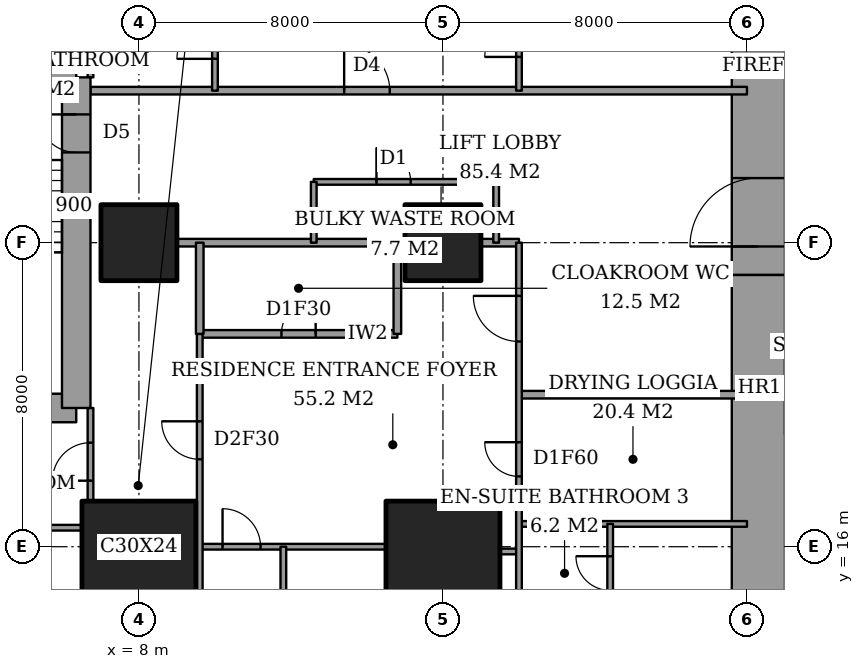
"""IFC4 building model, lengths in metres.
Left out: names, types, materials, properties, quantities, classifications, styles, units other than length and angle.
Written with IfcOpenShell. Run it as: python <this file> out.ifc"""

import sys

from ifc_helpers import new_model, si_unit, direction, frame, frame_2d, origin, origin_2d, place, context, subcontext, project, spatial, rectangle, extrude, element, fill, save


model = new_model("IFC4")
c1 = context("Model", 3, precision=1e-05, world=origin(), true_north=direction((0.0, 1.0)))
c2 = subcontext(c1, "Body", "Model", "MODEL_VIEW")
j1 = project(units=[si_unit("LENGTHUNIT", "METRE"), si_unit("PLANEANGLEUNIT", "RADIAN")], contexts=[c1])
p1 = place(None, origin())
s1 = spatial("IfcSite", under=j1, at=p1, CompositionType="ELEMENT")
p2 = place(p1, origin())
s2 = spatial("IfcBuilding", under=s1, at=p2, CompositionType="ELEMENT")
p3 = place(p2, frame((0.0, 0.0, 83.6)))
s3 = spatial("IfcBuildingStorey", under=s2, at=p3, CompositionType="ELEMENT", Elevation=83.6)
p4 = place(p3, frame((8.0, 16.0, 0.0), z_axis=(0.0, 0.0, 1.0), x_axis=(1.0, 0.0, 0.0)))
e1 = element("IfcColumn", 1, at=p4, inside=s3, PredefinedType="COLUMN", context=c2, shape_type="SweptSolid", body=[
    extrude(rectangle(XDim=3.0, YDim=2.4, at=origin_2d()), origin(), (0.0, 0.0, 1.0), 3.6),
])
p5 = place(p3, frame((8.0, 24.0, 0.0), z_axis=(0.0, 0.0, 1.0), x_axis=(1.0, 0.0, 0.0)))
e2 = element("IfcColumn", 2, at=p5, inside=s3, PredefinedType="COLUMN", context=c2, shape_type="SweptSolid", body=[
    extrude(rectangle(XDim=2.0, YDim=2.0, at=origin_2d()), origin(), (0.0, 0.0, 1.0), 3.6),
])
p6 = place(p3, frame((16.0, 16.0, 0.0), z_axis=(0.0, 0.0, 1.0), x_axis=(1.0, 0.0, 0.0)))
e3 = element("IfcColumn", 3, at=p6, inside=s3, PredefinedType="COLUMN", context=c2, shape_type="SweptSolid", body=[
    extrude(rectangle(XDim=3.0, YDim=2.4, at=origin_2d()), origin(), (0.0, 0.0, 1.0), 3.6),
])
p7 = place(p3, frame((16.0, 24.0, 0.0), z_axis=(0.0, 0.0, 1.0), x_axis=(1.0, 0.0, 0.0)))
e4 = element("IfcColumn", 4, at=p7, inside=s3, PredefinedType="COLUMN", context=c2, shape_type="SweptSolid", body=[
    extrude(rectangle(XDim=2.0, YDim=2.0, at=origin_2d()), origin(), (0.0, 0.0, 1.0), 3.6),
])
p8 = place(p3, frame((24.3, 13.0, 0.0), z_axis=(0.0, 0.0, 1.0), x_axis=(0.0, 1.0, 0.0)))
e5 = element("IfcWall", 5, at=p8, inside=s3, PredefinedType="SHEAR", context=c2, shape_type="SweptSolid", body=[
    extrude(rectangle(XDim=10.15, YDim=1.4, at=frame_2d((5.075, 0.0))), origin(), (0.0, 0.0, 1.0), 3.6),
])
p9 = place(p3, frame((24.3, 23.15, 0.0), z_axis=(0.0, 0.0, 1.0), x_axis=(0.0, 1.0, 0.0)))
e6 = element("IfcWall", 6, at=p9, inside=s3, PredefinedType="SHEAR", context=c2, shape_type="SweptSolid", body=[
    extrude(rectangle(XDim=11.85, YDim=1.4, at=frame_2d((5.925, 0.0))), origin(), (0.0, 0.0, 1.0), 3.6),
])
p10 = place(p9, frame((0.75, 0.0, 0.0)))
e7 = element("IfcOpeningElement", 7, at=p10, cuts=e6, PredefinedType="OPENING", context=c2, shape_type="SweptSolid", body=[
    extrude(rectangle(XDim=1.8, YDim=2.4, at=frame_2d((0.9, 1.2))), frame((0.0, 0.71, 0.0), z_axis=(0.0, -1.0, 0.0), x_axis=(1.0, 0.0, 0.0)), (0.0, 0.0, 1.0), 1.42),
])
p11 = place(p3, frame((1.9, 19.65, 0.0), z_axis=(0.0, 0.0, 1.0), x_axis=(1.0, 0.0, 0.0)))
e8 = element("IfcWall", 8, at=p11, inside=s3, PredefinedType="SHEAR", context=c2, shape_type="SweptSolid", body=[
    extrude(rectangle(XDim=4.45, YDim=0.75, at=frame_2d((2.225, 0.0))), origin(), (0.0, 0.0, 1.0), 3.6),
])
p12 = place(p3, frame((6.35, 19.65, 0.0), z_axis=(0.0, 0.0, 1.0), x_axis=(0.0, 1.0, 0.0)))
e9 = element("IfcWall", 9, at=p12, inside=s3, PredefinedType="SHEAR", context=c2, shape_type="SweptSolid", body=[
    extrude(rectangle(XDim=8.7, YDim=0.75, at=frame_2d((4.35, 0.0))), origin(), (0.0, 0.0, 1.0), 3.6),
])
p13 = place(p12, frame((6.725, 0.0, 0.0)))
e10 = element("IfcOpeningElement", 10, at=p13, cuts=e9, PredefinedType="OPENING", context=c2, shape_type="SweptSolid", body=[
    extrude(rectangle(XDim=1.0, YDim=2.1, at=frame_2d((0.5, 1.05))), frame((0.0, 0.385, 0.0), z_axis=(0.0, -1.0, 0.0), x_axis=(1.0, 0.0, 0.0)), (0.0, 0.0, 1.0), 0.77),
])
p14 = place(p3, frame((6.35, 28.35, 0.0), z_axis=(0.0, 0.0, 1.0), x_axis=(-1.0, 0.0, 0.0)))
e11 = element("IfcWall", 11, at=p14, inside=s3, PredefinedType="SHEAR", context=c2, shape_type="SweptSolid", body=[
    extrude(rectangle(XDim=4.45, YDim=0.75, at=frame_2d((2.225, 0.0))), origin(), (0.0, 0.0, 1.0), 3.6),
])
p15 = place(p3, frame((17.5, 15.875, 0.0), z_axis=(0.0, 0.0, 1.0), x_axis=(1.0, 0.0, 0.0)))
e12 = element("IfcWall", 12, at=p15, inside=s3, PredefinedType="PARTITIONING", context=c2, shape_type="SweptSolid", body=[
    extrude(rectangle(XDim=0.5, YDim=0.15, at=frame_2d((0.25, 0.0))), origin(), (0.0, 0.0, 1.0), 2.634),
])
p16 = place(p3, frame((9.6, 16.0, 0.0), z_axis=(0.0, 0.0, 1.0), x_axis=(1.0, 0.0, 0.0)))
e13 = element("IfcWall", 13, at=p16, inside=s3, PredefinedType="PARTITIONING", context=c2, shape_type="SweptSolid", body=[
    extrude(rectangle(XDim=4.9, YDim=0.15, at=frame_2d((2.45, 0.0))), origin(), (0.0, 0.0, 1.0), 2.634),
])
p17 = place(p16, frame((0.6, 0.0, 0.0)))
e14 = element("IfcOpeningElement", 14, at=p17, cuts=e13, PredefinedType="OPENING", context=c2, shape_type="SweptSolid", body=[
    extrude(rectangle(XDim=1.0, YDim=2.1, at=frame_2d((0.5, 1.05))), frame((0.0, 0.085, 0.0), z_axis=(0.0, -1.0, 0.0), x_axis=(1.0, 0.0, 0.0)), (0.0, 0.0, 1.0), 0.17),
])
p18 = place(p3, frame((1.35, 16.5, 0.0), z_axis=(0.0, 0.0, 1.0), x_axis=(1.0, 0.0, 0.0)))
e15 = element("IfcWall", 15, at=p18, inside=s3, PredefinedType="PARTITIONING", context=c2, shape_type="SweptSolid", body=[
    extrude(rectangle(XDim=5.15, YDim=0.15, at=frame_2d((2.575, 0.0))), origin(), (0.0, 0.0, 1.0), 3.35),
])
p19 = place(p3, frame((18.0, 16.6, 0.0), z_axis=(0.0, 0.0, 1.0), x_axis=(1.0, 0.0, 0.0)))
e16 = element("IfcWall", 16, at=p19, inside=s3, PredefinedType="PARTITIONING", context=c2, shape_type="SweptSolid", body=[
    extrude(rectangle(XDim=6.0, YDim=0.15, at=frame_2d((3.0, 0.0))), origin(), (0.0, 0.0, 1.0), 3.35),
])
p20 = place(p3, frame((18.0, 20.0, 0.0), z_axis=(0.0, 0.0, 1.0), x_axis=(1.0, 0.0, 0.0)))
e17 = element("IfcWall", 17, at=p20, inside=s3, PredefinedType="PARTITIONING", context=c2, shape_type="SweptSolid", body=[
    extrude(rectangle(XDim=6.0, YDim=0.2, at=frame_2d((3.0, 0.0))), origin(), (0.0, 0.0, 1.0), 3.35),
])
p21 = place(p3, frame((9.6, 21.6, 0.0), z_axis=(0.0, 0.0, 1.0), x_axis=(1.0, 0.0, 0.0)))
e18 = element("IfcWall", 18, at=p21, inside=s3, PredefinedType="PARTITIONING", context=c2, shape_type="SweptSolid", body=[
    extrude(rectangle(XDim=5.2, YDim=0.2, at=frame_2d((2.6, 0.0))), origin(), (0.0, 0.0, 1.0), 3.35),
])
p22 = place(p21, frame((2.15, 0.0, 0.0)))
e19 = element("IfcOpeningElement", 19, at=p22, cuts=e18, PredefinedType="OPENING", context=c2, shape_type="SweptSolid", body=[
    extrude(rectangle(XDim=0.9, YDim=2.1, at=frame_2d((0.45, 1.05))), frame((0.0, 0.11, 0.0), z_axis=(0.0, -1.0, 0.0), x_axis=(1.0, 0.0, 0.0)), (0.0, 0.0, 1.0), 0.22),
])
p23 = place(p3, frame((9.0, 24.0, 0.0), z_axis=(0.0, 0.0, 1.0), x_axis=(1.0, 0.0, 0.0)))
e20 = element("IfcWall", 20, at=p23, inside=s3, PredefinedType="PARTITIONING", context=c2, shape_type="SweptSolid", body=[
    extrude(rectangle(XDim=6.0, YDim=0.2, at=frame_2d((3.0, 0.0))), origin(), (0.0, 0.0, 1.0), 3.35),
])
p24 = place(p3, frame((17.0, 24.0, 0.0), z_axis=(0.0, 0.0, 1.0), x_axis=(1.0, 0.0, 0.0)))
e21 = element("IfcWall", 21, at=p24, inside=s3, PredefinedType="PARTITIONING", context=c2, shape_type="SweptSolid", body=[
    extrude(rectangle(XDim=1.0, YDim=0.2, at=frame_2d((0.5, 0.0))), origin(), (0.0, 0.0, 1.0), 3.35),
])
p25 = place(p3, frame((12.6, 25.6, 0.0), z_axis=(0.0, 0.0, 1.0), x_axis=(1.0, 0.0, 0.0)))
e22 = element("IfcWall", 22, at=p25, inside=s3, PredefinedType="PARTITIONING", context=c2, shape_type="SweptSolid", body=[
    extrude(rectangle(XDim=4.8, YDim=0.15, at=frame_2d((2.4, 0.0))), origin(), (0.0, 0.0, 1.0), 3.35),
])
p26 = place(p25, frame((1.65, 0.0, 0.0)))
e23 = element("IfcOpeningElement", 23, at=p26, cuts=e22, PredefinedType="OPENING", context=c2, shape_type="SweptSolid", body=[
    extrude(rectangle(XDim=0.9, YDim=2.1, at=frame_2d((0.45, 1.05))), frame((0.0, 0.085, 0.0), z_axis=(0.0, -1.0, 0.0), x_axis=(1.0, 0.0, 0.0)), (0.0, 0.0, 1.0), 0.17),
])
p27 = place(p3, frame((6.725, 28.0, 0.0), z_axis=(0.0, 0.0, 1.0), x_axis=(1.0, 0.0, 0.0)))
e24 = element("IfcWall", 24, at=p27, inside=s3, PredefinedType="PARTITIONING", context=c2, shape_type="SweptSolid", body=[
    extrude(rectangle(XDim=17.275, YDim=0.2, at=frame_2d((8.637, 0.0))), origin(), (0.0, 0.0, 1.0), 3.35),
])
p28 = place(p27, frame((6.675, 0.0, 0.0)))
e25 = element("IfcOpeningElement", 25, at=p28, cuts=e24, PredefinedType="OPENING", context=c2, shape_type="SweptSolid", body=[
    extrude(rectangle(XDim=1.2, YDim=2.4, at=frame_2d((0.6, 1.2))), frame((0.0, 0.11, 0.0), z_axis=(0.0, -1.0, 0.0), x_axis=(1.0, 0.0, 0.0)), (0.0, 0.0, 1.0), 0.22),
])
p29 = place(p3, frame((6.725, 17.2, 0.0), z_axis=(0.0, 0.0, 1.0), x_axis=(0.0, 1.0, 0.0)))
e26 = element("IfcWall", 26, at=p29, inside=s3, PredefinedType="PARTITIONING", context=c2, shape_type="SweptSolid", body=[
    extrude(rectangle(XDim=2.45, YDim=0.15, at=frame_2d((1.225, 0.0))), origin(), (0.0, 0.0, 1.0), 3.35),
])
p30 = place(p29, frame((0.538, 0.0, 0.0)))
e27 = element("IfcOpeningElement", 27, at=p30, cuts=e26, PredefinedType="OPENING", context=c2, shape_type="SweptSolid", body=[
    extrude(rectangle(XDim=1.0, YDim=2.1, at=frame_2d((0.5, 1.05))), frame((0.0, 0.085, 0.0), z_axis=(0.0, -1.0, 0.0), x_axis=(1.0, 0.0, 0.0)), (0.0, 0.0, 1.0), 0.17),
])
p31 = place(p3, frame((6.725, 28.35, 0.0), z_axis=(0.0, 0.0, 1.0), x_axis=(0.0, 1.0, 0.0)))
e28 = element("IfcWall", 28, at=p31, inside=s3, PredefinedType="PARTITIONING", context=c2, shape_type="SweptSolid", body=[
    extrude(rectangle(XDim=2.45, YDim=0.15, at=frame_2d((1.225, 0.0))), origin(), (0.0, 0.0, 1.0), 3.35),
])
p32 = place(p31, frame((0.962, 0.0, 0.0)))
e29 = element("IfcOpeningElement", 29, at=p32, cuts=e28, PredefinedType="OPENING", context=c2, shape_type="SweptSolid", body=[
    extrude(rectangle(XDim=0.9, YDim=2.1, at=frame_2d((0.45, 1.05))), frame((0.0, 0.085, 0.0), z_axis=(0.0, -1.0, 0.0), x_axis=(1.0, 0.0, 0.0)), (0.0, 0.0, 1.0), 0.17),
])
p33 = place(p3, frame((9.6, 21.6, 0.0), z_axis=(0.0, 0.0, 1.0), x_axis=(0.0, 1.0, 0.0)))
e30 = element("IfcWall", 30, at=p33, inside=s3, PredefinedType="PARTITIONING", context=c2, shape_type="SweptSolid", body=[
    extrude(rectangle(XDim=2.4, YDim=0.2, at=frame_2d((1.2, 0.0))), origin(), (0.0, 0.0, 1.0), 3.35),
])
p34 = place(p3, frame((9.6, 10.6, 0.0), z_axis=(0.0, 0.0, 1.0), x_axis=(0.0, 1.0, 0.0)))
e31 = element("IfcWall", 31, at=p34, inside=s3, PredefinedType="PARTITIONING", context=c2, shape_type="SweptSolid", body=[
    extrude(rectangle(XDim=11.0, YDim=0.15, at=frame_2d((5.5, 0.0))), origin(), (0.0, 0.0, 1.0), 3.35),
])
p35 = place(p34, frame((7.7, 0.0, 0.0)))
e32 = element("IfcOpeningElement", 32, at=p35, cuts=e31, PredefinedType="OPENING", context=c2, shape_type="SweptSolid", body=[
    extrude(rectangle(XDim=1.0, YDim=2.1, at=frame_2d((0.5, 1.05))), frame((0.0, 0.085, 0.0), z_axis=(0.0, -1.0, 0.0), x_axis=(1.0, 0.0, 0.0)), (0.0, 0.0, 1.0), 0.17),
])
p36 = place(p3, frame((10.0, 28.0, 0.0), z_axis=(0.0, 0.0, 1.0), x_axis=(0.0, 1.0, 0.0)))
e33 = element("IfcWall", 33, at=p36, inside=s3, PredefinedType="PARTITIONING", context=c2, shape_type="SweptSolid", body=[
    extrude(rectangle(XDim=3.0, YDim=0.15, at=frame_2d((1.5, 0.0))), origin(), (0.0, 0.0, 1.0), 3.35),
])
p37 = place(p36, frame((0.837, 0.0, 0.0)))
e34 = element("IfcOpeningElement", 34, at=p37, cuts=e33, PredefinedType="OPENING", context=c2, shape_type="SweptSolid", body=[
    extrude(rectangle(XDim=1.0, YDim=2.1, at=frame_2d((0.5, 1.05))), frame((0.0, 0.085, 0.0), z_axis=(0.0, -1.0, 0.0), x_axis=(1.0, 0.0, 0.0)), (0.0, 0.0, 1.0), 0.17),
])
p38 = place(p3, frame((11.8, 10.6, 0.0), z_axis=(0.0, 0.0, 1.0), x_axis=(0.0, 1.0, 0.0)))
e35 = element("IfcWall", 35, at=p38, inside=s3, PredefinedType="PARTITIONING", context=c2, shape_type="SweptSolid", body=[
    extrude(rectangle(XDim=5.4, YDim=0.15, at=frame_2d((2.7, 0.0))), origin(), (0.0, 0.0, 1.0), 3.35),
])
p39 = place(p3, frame((12.6, 24.0, 0.0), z_axis=(0.0, 0.0, 1.0), x_axis=(0.0, 1.0, 0.0)))
e36 = element("IfcWall", 36, at=p39, inside=s3, PredefinedType="PARTITIONING", context=c2, shape_type="SweptSolid", body=[
    extrude(rectangle(XDim=1.6, YDim=0.15, at=frame_2d((0.8, 0.0))), origin(), (0.0, 0.0, 1.0), 3.35),
])
p40 = place(p3, frame((14.8, 21.6, 0.0), z_axis=(0.0, 0.0, 1.0), x_axis=(0.0, 1.0, 0.0)))
e37 = element("IfcWall", 37, at=p40, inside=s3, PredefinedType="PARTITIONING", context=c2, shape_type="SweptSolid", body=[
    extrude(rectangle(XDim=2.4, YDim=0.2, at=frame_2d((1.2, 0.0))), origin(), (0.0, 0.0, 1.0), 3.35),
])
p41 = place(p3, frame((17.4, 24.0, 0.0), z_axis=(0.0, 0.0, 1.0), x_axis=(0.0, 1.0, 0.0)))
e38 = element("IfcWall", 38, at=p41, inside=s3, PredefinedType="PARTITIONING", context=c2, shape_type="SweptSolid", body=[
    extrude(rectangle(XDim=1.6, YDim=0.15, at=frame_2d((0.8, 0.0))), origin(), (0.0, 0.0, 1.0), 3.35),
])
p42 = place(p3, frame((18.0, 10.6, 0.0), z_axis=(0.0, 0.0, 1.0), x_axis=(0.0, 1.0, 0.0)))
e39 = element("IfcWall", 39, at=p42, inside=s3, PredefinedType="PARTITIONING", context=c2, shape_type="SweptSolid", body=[
    extrude(rectangle(XDim=13.4, YDim=0.15, at=frame_2d((6.7, 0.0))), origin(), (0.0, 0.0, 1.0), 3.35),
])
p43 = place(p42, frame((10.8, 0.0, 0.0)))
e40 = element("IfcOpeningElement", 40, at=p43, cuts=e39, PredefinedType="OPENING", context=c2, shape_type="SweptSolid", body=[
    extrude(rectangle(XDim=1.2, YDim=2.4, at=frame_2d((0.6, 1.2))), frame((0.0, 0.085, 0.0), z_axis=(0.0, -1.0, 0.0), x_axis=(1.0, 0.0, 0.0)), (0.0, 0.0, 1.0), 0.17),
])
p44 = place(p42, frame((7.25, 0.0, 0.0)))
e41 = element("IfcOpeningElement", 41, at=p44, cuts=e39, PredefinedType="OPENING", context=c2, shape_type="SweptSolid", body=[
    extrude(rectangle(XDim=0.9, YDim=2.1, at=frame_2d((0.45, 1.05))), frame((0.0, 0.085, 0.0), z_axis=(0.0, -1.0, 0.0), x_axis=(1.0, 0.0, 0.0)), (0.0, 0.0, 1.0), 0.17),
])
p45 = place(p3, frame((18.0, 28.0, 0.0), z_axis=(0.0, 0.0, 1.0), x_axis=(0.0, 1.0, 0.0)))
e42 = element("IfcWall", 42, at=p45, inside=s3, PredefinedType="PARTITIONING", context=c2, shape_type="SweptSolid", body=[
    extrude(rectangle(XDim=9.4, YDim=0.15, at=frame_2d((4.7, 0.0))), origin(), (0.0, 0.0, 1.0), 3.35),
])
p46 = place(p45, frame((0.887, 0.0, 0.0)))
e43 = element("IfcOpeningElement", 43, at=p46, cuts=e42, PredefinedType="OPENING", context=c2, shape_type="SweptSolid", body=[
    extrude(rectangle(XDim=0.9, YDim=2.1, at=frame_2d((0.45, 1.05))), frame((0.0, 0.085, 0.0), z_axis=(0.0, -1.0, 0.0), x_axis=(1.0, 0.0, 0.0)), (0.0, 0.0, 1.0), 0.17),
])
p47 = place(p3, frame((20.4, 14.0, 0.0), z_axis=(0.0, 0.0, 1.0), x_axis=(0.0, 1.0, 0.0)))
e44 = element("IfcWall", 44, at=p47, inside=s3, PredefinedType="PARTITIONING", context=c2, shape_type="SweptSolid", body=[
    extrude(rectangle(XDim=2.6, YDim=0.15, at=frame_2d((1.3, 0.0))), origin(), (0.0, 0.0, 1.0), 3.35),
])
p48 = place(p47, frame((0.85, 0.0, 0.0)))
e45 = element("IfcOpeningElement", 45, at=p48, cuts=e44, PredefinedType="OPENING", context=c2, shape_type="SweptSolid", body=[
    extrude(rectangle(XDim=0.9, YDim=2.1, at=frame_2d((0.45, 1.05))), frame((0.0, 0.085, 0.0), z_axis=(0.0, -1.0, 0.0), x_axis=(1.0, 0.0, 0.0)), (0.0, 0.0, 1.0), 0.17),
])
p49 = place(p30, origin())
e46 = element("IfcDoor", 46, at=p49, inside=s3, OperationType="SINGLE_SWING_RIGHT", PredefinedType="DOOR", context=c2, shape_type="SweptSolid", body=[
    extrude(rectangle(XDim=1.0, YDim=2.1, at=frame_2d((0.5, 1.05))), frame((0.0, 0.025, 0.0), z_axis=(0.0, -1.0, 0.0), x_axis=(1.0, 0.0, 0.0)), (0.0, 0.0, 1.0), 0.05),
])
fill(e27, e46)
p50 = place(p35, origin())
e47 = element("IfcDoor", 47, at=p50, inside=s3, OperationType="SINGLE_SWING_LEFT", PredefinedType="DOOR", context=c2, shape_type="SweptSolid", body=[
    extrude(rectangle(XDim=1.0, YDim=2.1, at=frame_2d((0.5, 1.05))), frame((0.0, 0.025, 0.0), z_axis=(0.0, -1.0, 0.0), x_axis=(1.0, 0.0, 0.0)), (0.0, 0.0, 1.0), 0.05),
])
fill(e32, e47)
p51 = place(p22, origin())
e48 = element("IfcDoor", 48, at=p51, inside=s3, OperationType="SINGLE_SWING_LEFT", PredefinedType="DOOR", context=c2, shape_type="SweptSolid", body=[
    extrude(rectangle(XDim=0.9, YDim=2.1, at=frame_2d((0.45, 1.05))), frame((0.0, 0.025, 0.0), z_axis=(0.0, -1.0, 0.0), x_axis=(1.0, 0.0, 0.0)), (0.0, 0.0, 1.0), 0.05),
])
fill(e19, e48)
p52 = place(p43, origin())
e49 = element("IfcDoor", 49, at=p52, inside=s3, OperationType="SINGLE_SWING_LEFT", PredefinedType="DOOR", context=c2, shape_type="SweptSolid", body=[
    extrude(rectangle(XDim=1.2, YDim=2.4, at=frame_2d((0.6, 1.2))), frame((0.0, 0.025, 0.0), z_axis=(0.0, -1.0, 0.0), x_axis=(1.0, 0.0, 0.0)), (0.0, 0.0, 1.0), 0.05),
])
fill(e40, e49)
p53 = place(p17, origin())
e50 = element("IfcDoor", 50, at=p53, inside=s3, OperationType="SINGLE_SWING_RIGHT", PredefinedType="DOOR", context=c2, shape_type="SweptSolid", body=[
    extrude(rectangle(XDim=1.0, YDim=2.1, at=frame_2d((0.5, 1.05))), frame((0.0, 0.025, 0.0), z_axis=(0.0, -1.0, 0.0), x_axis=(1.0, 0.0, 0.0)), (0.0, 0.0, 1.0), 0.05),
])
fill(e14, e50)
p54 = place(p48, origin())
e51 = element("IfcDoor", 51, at=p54, inside=s3, OperationType="SINGLE_SWING_LEFT", PredefinedType="DOOR", context=c2, shape_type="SweptSolid", body=[
    extrude(rectangle(XDim=0.9, YDim=2.1, at=frame_2d((0.45, 1.05))), frame((0.0, 0.025, 0.0), z_axis=(0.0, -1.0, 0.0), x_axis=(1.0, 0.0, 0.0)), (0.0, 0.0, 1.0), 0.05),
])
fill(e45, e51)
p55 = place(p44, origin())
e52 = element("IfcDoor", 52, at=p55, inside=s3, OperationType="SINGLE_SWING_LEFT", PredefinedType="DOOR", context=c2, shape_type="SweptSolid", body=[
    extrude(rectangle(XDim=0.9, YDim=2.1, at=frame_2d((0.45, 1.05))), frame((0.0, 0.025, 0.0), z_axis=(0.0, -1.0, 0.0), x_axis=(1.0, 0.0, 0.0)), (0.0, 0.0, 1.0), 0.05),
])
fill(e41, e52)
p56 = place(p37, origin())
e53 = element("IfcDoor", 53, at=p56, inside=s3, OperationType="SINGLE_SWING_RIGHT", PredefinedType="DOOR", context=c2, shape_type="SweptSolid", body=[
    extrude(rectangle(XDim=1.0, YDim=2.1, at=frame_2d((0.5, 1.05))), frame((0.0, 0.025, 0.0), z_axis=(0.0, -1.0, 0.0), x_axis=(1.0, 0.0, 0.0)), (0.0, 0.0, 1.0), 0.05),
])
fill(e34, e53)
p57 = place(p28, origin())
e54 = element("IfcDoor", 54, at=p57, inside=s3, OperationType="SINGLE_SWING_RIGHT", PredefinedType="DOOR", context=c2, shape_type="SweptSolid", body=[
    extrude(rectangle(XDim=1.2, YDim=2.4, at=frame_2d((0.6, 1.2))), frame((0.0, 0.025, 0.0), z_axis=(0.0, -1.0, 0.0), x_axis=(1.0, 0.0, 0.0)), (0.0, 0.0, 1.0), 0.05),
])
fill(e25, e54)
p58 = place(p46, origin())
e55 = element("IfcDoor", 55, at=p58, inside=s3, OperationType="SINGLE_SWING_RIGHT", PredefinedType="DOOR", context=c2, shape_type="SweptSolid", body=[
    extrude(rectangle(XDim=0.9, YDim=2.1, at=frame_2d((0.45, 1.05))), frame((0.0, 0.025, 0.0), z_axis=(0.0, -1.0, 0.0), x_axis=(1.0, 0.0, 0.0)), (0.0, 0.0, 1.0), 0.05),
])
fill(e43, e55)
p59 = place(p26, origin())
e56 = element("IfcDoor", 56, at=p59, inside=s3, OperationType="SINGLE_SWING_RIGHT", PredefinedType="DOOR", context=c2, shape_type="SweptSolid", body=[
    extrude(rectangle(XDim=0.9, YDim=2.1, at=frame_2d((0.45, 1.05))), frame((0.0, 0.025, 0.0), z_axis=(0.0, -1.0, 0.0), x_axis=(1.0, 0.0, 0.0)), (0.0, 0.0, 1.0), 0.05),
])
fill(e23, e56)
p60 = place(p10, origin())
e57 = element("IfcDoor", 57, at=p60, inside=s3, OperationType="DOUBLE_DOOR_DOUBLE_SWING", PredefinedType="DOOR", context=c2, shape_type="SweptSolid", body=[
    extrude(rectangle(XDim=1.8, YDim=2.4, at=frame_2d((0.9, 1.2))), frame((0.0, 0.025, 0.0), z_axis=(0.0, -1.0, 0.0), x_axis=(1.0, 0.0, 0.0)), (0.0, 0.0, 1.0), 0.05),
])
fill(e7, e57)
p61 = place(p13, origin())
e58 = element("IfcDoor", 58, at=p61, inside=s3, OperationType="SINGLE_SWING_LEFT", PredefinedType="DOOR", context=c2, shape_type="SweptSolid", body=[
    extrude(rectangle(XDim=1.0, YDim=2.1, at=frame_2d((0.5, 1.05))), frame((0.0, 0.025, 0.0), z_axis=(0.0, -1.0, 0.0), x_axis=(1.0, 0.0, 0.0)), (0.0, 0.0, 1.0), 0.05),
])
fill(e10, e58)
save(model, sys.argv[1])
